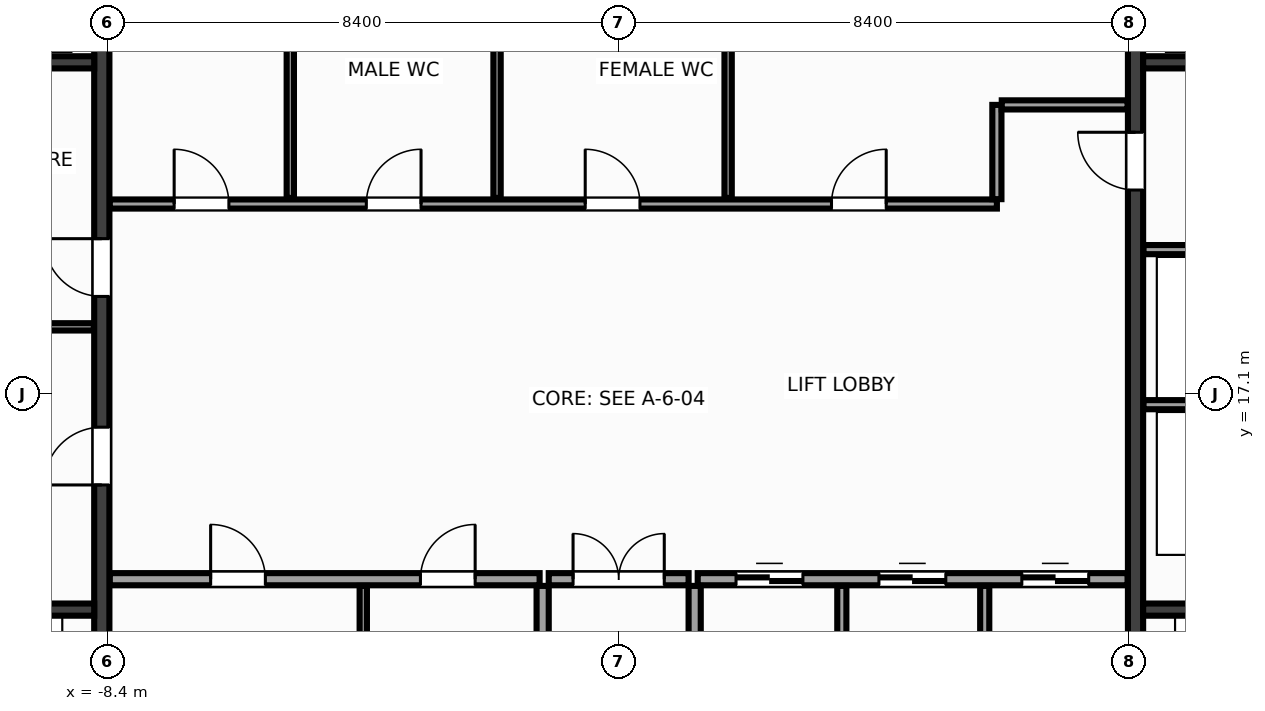
"""IFC4 building model, lengths in metres.
Left out: names, types, materials, properties, quantities, classifications, styles, units other than length and angle.
Written with IfcOpenShell. Run it as: python <this file> out.ifc"""

import sys

from ifc_helpers import new_model, si_unit, direction, frame, frame_2d, origin, place, context, subcontext, project, spatial, rectangle, extrude, source, transform, mapped, element, fill, save


model = new_model("IFC4")
c1 = context("Model", 3, precision=1e-05, world=origin(), true_north=direction((0.0, 1.0)))
c2 = subcontext(c1, "Body", "Model", "MODEL_VIEW")
j1 = project(units=[si_unit("LENGTHUNIT", "METRE"), si_unit("PLANEANGLEUNIT", "RADIAN")], contexts=[c1])
p1 = place(None, origin())
s1 = spatial("IfcSite", under=j1, at=p1, CompositionType="ELEMENT")
p2 = place(p1, origin())
s2 = spatial("IfcBuilding", under=s1, at=p2, CompositionType="ELEMENT")
p3 = place(p2, frame((0.0, 0.0, 117.2)))
s3 = spatial("IfcBuildingStorey", under=s2, at=p3, CompositionType="ELEMENT", Elevation=117.2)
m1 = source(origin(), c2, "Body", "SweptSolid", [
    extrude(rectangle(XDim=12.95, YDim=0.25, at=frame_2d((6.475, 0.0))), origin(), (0.0, 0.0, 1.0), 3.6),
])
p4 = place(p3, frame((-8.5, 10.525, 0.0), z_axis=(0.0, 0.0, 1.0), x_axis=(0.0, 1.0, 0.0)))
e1 = element("IfcWall", 1, at=p4, inside=s3, PredefinedType="SHEAR", context=c2, shape_type="MappedRepresentation", body=[
    mapped(m1, transform((0.0, 0.0, 0.0), x_axis=(1.0, 0.0, 0.0), y_axis=(0.0, 1.0, 0.0), z_axis=(0.0, 0.0, 1.0), scale=1.0)),
])
p5 = place(p4, frame((5.075, 0.0, 0.0)))
e2 = element("IfcOpeningElement", 2, at=p5, cuts=e1, PredefinedType="OPENING", context=c2, shape_type="SweptSolid", body=[
    extrude(rectangle(XDim=0.95, YDim=2.15, at=frame_2d((0.475, 1.075))), frame((0.0, 0.137, 0.0), z_axis=(0.0, -1.0, 0.0), x_axis=(1.0, 0.0, 0.0)), (0.0, 0.0, 1.0), 0.274),
])
p6 = place(p4, frame((8.175, 0.0, 0.0)))
e3 = element("IfcOpeningElement", 3, at=p6, cuts=e1, PredefinedType="OPENING", context=c2, shape_type="SweptSolid", body=[
    extrude(rectangle(XDim=0.95, YDim=2.15, at=frame_2d((0.475, 1.075))), frame((0.0, 0.137, 0.0), z_axis=(0.0, -1.0, 0.0), x_axis=(1.0, 0.0, 0.0)), (0.0, 0.0, 1.0), 0.274),
])
p7 = place(p3, frame((8.5, 10.525, 0.0), z_axis=(0.0, 0.0, 1.0), x_axis=(0.0, 1.0, 0.0)))
e4 = element("IfcWall", 4, at=p7, inside=s3, PredefinedType="SHEAR", context=c2, shape_type="MappedRepresentation", body=[
    mapped(m1, transform((0.0, 0.0, 0.0), x_axis=(1.0, 0.0, 0.0), y_axis=(0.0, 1.0, 0.0), z_axis=(0.0, 0.0, 1.0), scale=1.0)),
])
p8 = place(p7, frame((9.925, 0.0, 0.0)))
e5 = element("IfcOpeningElement", 5, at=p8, cuts=e4, PredefinedType="OPENING", context=c2, shape_type="SweptSolid", body=[
    extrude(rectangle(XDim=0.95, YDim=2.15, at=frame_2d((0.475, 1.075))), frame((0.0, 0.137, 0.0), z_axis=(0.0, -1.0, 0.0), x_axis=(1.0, 0.0, 0.0)), (0.0, 0.0, 1.0), 0.274),
])
m2 = source(origin(), c2, "Body", "SweptSolid", [
    extrude(rectangle(XDim=2.825, YDim=0.2, at=frame_2d((1.413, 0.0))), origin(), (0.0, 0.0, 1.0), 3.6),
])
for number, where, z_axis, x_axis in (
    (6, (-11.45, 13.55, 0.0), (0.0, 0.0, 1.0), (1.0, 0.0, 0.0)),
    (7, (8.625, 13.55, 0.0), (0.0, 0.0, 1.0), (1.0, 0.0, 0.0)),
):
    element("IfcWall", number, at=place(p3, frame(where, z_axis=z_axis, x_axis=x_axis)), inside=s3, PredefinedType="SHEAR", context=c2, shape_type="MappedRepresentation", body=[
        mapped(m2, transform((0.0, 0.0, 0.0), x_axis=(1.0, 0.0, 0.0), y_axis=(0.0, 1.0, 0.0), z_axis=(0.0, 0.0, 1.0), scale=1.0)),
    ])
m3 = source(origin(), c2, "Body", "SweptSolid", [
    extrude(rectangle(XDim=3.02, YDim=0.2, at=frame_2d((1.51, 0.0))), origin(), (0.0, 0.0, 1.0), 3.6),
])
for number, where, z_axis, x_axis in (
    (8, (-11.645, 22.55, 0.0), (0.0, 0.0, 1.0), (1.0, 0.0, 0.0)),
    (9, (8.625, 22.55, 0.0), (0.0, 0.0, 1.0), (1.0, 0.0, 0.0)),
):
    element("IfcWall", number, at=place(p3, frame(where, z_axis=z_axis, x_axis=x_axis)), inside=s3, PredefinedType="SHEAR", context=c2, shape_type="MappedRepresentation", body=[
        mapped(m3, transform((0.0, 0.0, 0.0), x_axis=(1.0, 0.0, 0.0), y_axis=(0.0, 1.0, 0.0), z_axis=(0.0, 0.0, 1.0), scale=1.0)),
    ])
m4 = source(origin(), c2, "Body", "SweptSolid", [
    extrude(rectangle(XDim=3.01, YDim=0.12, at=frame_2d((1.505, 0.0))), origin(), (0.0, 0.0, 1.0), 3.36),
])
p9 = place(p3, frame((-11.64, 18.2, 0.0), z_axis=(0.0, 0.0, 1.0), x_axis=(1.0, 0.0, 0.0)))
e10 = element("IfcWall", 10, at=p9, inside=s3, PredefinedType="PARTITIONING", context=c2, shape_type="MappedRepresentation", body=[
    mapped(m4, transform((0.0, 0.0, 0.0), x_axis=(1.0, 0.0, 0.0), y_axis=(0.0, 1.0, 0.0), z_axis=(0.0, 0.0, 1.0), scale=1.0)),
])
m5 = source(origin(), c2, "Body", "SweptSolid", [
    extrude(rectangle(XDim=3.01, YDim=0.15, at=frame_2d((1.505, 0.0))), origin(), (0.0, 0.0, 1.0), 3.36),
])
for number, where, z_axis, x_axis in (
    (11, (8.63, 16.92, 0.0), (0.0, 0.0, 1.0), (1.0, 0.0, 0.0)),
    (12, (8.63, 19.47, 0.0), (0.0, 0.0, 1.0), (1.0, 0.0, 0.0)),
):
    element("IfcWall", number, at=place(p3, frame(where, z_axis=z_axis, x_axis=x_axis)), inside=s3, PredefinedType="PARTITIONING", context=c2, shape_type="MappedRepresentation", body=[
        mapped(m5, transform((0.0, 0.0, 0.0), x_axis=(1.0, 0.0, 0.0), y_axis=(0.0, 1.0, 0.0), z_axis=(0.0, 0.0, 1.0), scale=1.0)),
    ])
m6 = source(origin(), c2, "Body", "SweptSolid", [
    extrude(rectangle(XDim=7.07, YDim=0.2, at=frame_2d((3.535, 0.0))), origin(), (0.0, 0.0, 1.0), 3.36),
])
p10 = place(p3, frame((-8.37, 14.05, 0.0), z_axis=(0.0, 0.0, 1.0), x_axis=(1.0, 0.0, 0.0)))
e13 = element("IfcWall", 13, at=p10, inside=s3, PredefinedType="PARTITIONING", context=c2, shape_type="MappedRepresentation", body=[
    mapped(m6, transform((0.0, 0.0, 0.0), x_axis=(1.0, 0.0, 0.0), y_axis=(0.0, 1.0, 0.0), z_axis=(0.0, 0.0, 1.0), scale=1.0)),
])
p11 = place(p10, frame((1.66, 0.0, 0.0)))
e14 = element("IfcOpeningElement", 14, at=p11, cuts=e13, PredefinedType="OPENING", context=c2, shape_type="SweptSolid", body=[
    extrude(rectangle(XDim=0.9, YDim=2.15, at=frame_2d((0.45, 1.075))), frame((0.0, 0.112, 0.0), z_axis=(0.0, -1.0, 0.0), x_axis=(1.0, 0.0, 0.0)), (0.0, 0.0, 1.0), 0.224),
])
p12 = place(p10, frame((5.11, 0.0, 0.0)))
e15 = element("IfcOpeningElement", 15, at=p12, cuts=e13, PredefinedType="OPENING", context=c2, shape_type="SweptSolid", body=[
    extrude(rectangle(XDim=0.9, YDim=2.15, at=frame_2d((0.45, 1.075))), frame((0.0, 0.112, 0.0), z_axis=(0.0, -1.0, 0.0), x_axis=(1.0, 0.0, 0.0)), (0.0, 0.0, 1.0), 0.224),
])
p13 = place(p3, frame((1.3, 14.05, 0.0), z_axis=(0.0, 0.0, 1.0), x_axis=(1.0, 0.0, 0.0)))
e16 = element("IfcWall", 16, at=p13, inside=s3, PredefinedType="PARTITIONING", context=c2, shape_type="MappedRepresentation", body=[
    mapped(m6, transform((0.0, 0.0, 0.0), x_axis=(1.0, 0.0, 0.0), y_axis=(0.0, 1.0, 0.0), z_axis=(0.0, 0.0, 1.0), scale=1.0)),
])
p14 = place(p13, frame((0.63, 0.0, 0.0)))
e17 = element("IfcOpeningElement", 17, at=p14, cuts=e16, PredefinedType="OPENING", context=c2, shape_type="SweptSolid", body=[
    extrude(rectangle(XDim=1.1, YDim=2.15, at=frame_2d((0.55, 1.075))), frame((0.0, 0.112, 0.0), z_axis=(0.0, -1.0, 0.0), x_axis=(1.0, 0.0, 0.0)), (0.0, 0.0, 1.0), 0.224),
])
p15 = place(p13, frame((2.98, 0.0, 0.0)))
e18 = element("IfcOpeningElement", 18, at=p15, cuts=e16, PredefinedType="OPENING", context=c2, shape_type="SweptSolid", body=[
    extrude(rectangle(XDim=1.1, YDim=2.15, at=frame_2d((0.55, 1.075))), frame((0.0, 0.112, 0.0), z_axis=(0.0, -1.0, 0.0), x_axis=(1.0, 0.0, 0.0)), (0.0, 0.0, 1.0), 0.224),
])
p16 = place(p13, frame((5.33, 0.0, 0.0)))
e19 = element("IfcOpeningElement", 19, at=p16, cuts=e16, PredefinedType="OPENING", context=c2, shape_type="SweptSolid", body=[
    extrude(rectangle(XDim=1.1, YDim=2.15, at=frame_2d((0.55, 1.075))), frame((0.0, 0.112, 0.0), z_axis=(0.0, -1.0, 0.0), x_axis=(1.0, 0.0, 0.0)), (0.0, 0.0, 1.0), 0.224),
])
m7 = source(origin(), c2, "Body", "SweptSolid", [
    extrude(rectangle(XDim=3.415, YDim=0.2, at=frame_2d((1.708, 0.0))), origin(), (0.0, 0.0, 1.0), 3.36),
])
for number, where, z_axis, x_axis in (
    (20, (-1.25, 10.525, 0.0), (0.0, 0.0, 1.0), (0.0, 1.0, 0.0)),
    (21, (1.25, 10.525, 0.0), (0.0, 0.0, 1.0), (0.0, 1.0, 0.0)),
):
    element("IfcWall", number, at=place(p3, frame(where, z_axis=z_axis, x_axis=x_axis)), inside=s3, PredefinedType="PARTITIONING", context=c2, shape_type="MappedRepresentation", body=[
        mapped(m7, transform((0.0, 0.0, 0.0), x_axis=(1.0, 0.0, 0.0), y_axis=(0.0, 1.0, 0.0), z_axis=(0.0, 0.0, 1.0), scale=1.0)),
    ])
m8 = source(origin(), c2, "Body", "SweptSolid", [
    extrude(rectangle(XDim=2.3, YDim=0.2, at=frame_2d((1.15, 0.0))), origin(), (0.0, 0.0, 1.0), 3.36),
])
p17 = place(p3, frame((-1.15, 14.05, 0.0), z_axis=(0.0, 0.0, 1.0), x_axis=(1.0, 0.0, 0.0)))
e22 = element("IfcWall", 22, at=p17, inside=s3, PredefinedType="PARTITIONING", context=c2, shape_type="MappedRepresentation", body=[
    mapped(m8, transform((0.0, 0.0, 0.0), x_axis=(1.0, 0.0, 0.0), y_axis=(0.0, 1.0, 0.0), z_axis=(0.0, 0.0, 1.0), scale=1.0)),
])
p18 = place(p17, frame((0.4, 0.0, 0.0)))
e23 = element("IfcOpeningElement", 23, at=p18, cuts=e22, PredefinedType="OPENING", context=c2, shape_type="SweptSolid", body=[
    extrude(rectangle(XDim=1.5, YDim=2.2, at=frame_2d((0.75, 1.1))), frame((0.0, 0.112, 0.0), z_axis=(0.0, -1.0, 0.0), x_axis=(1.0, 0.0, 0.0)), (0.0, 0.0, 1.0), 0.224),
])
m9 = source(origin(), c2, "Body", "SweptSolid", [
    extrude(rectangle(XDim=14.59, YDim=0.15, at=frame_2d((7.295, 0.0))), origin(), (0.0, 0.0, 1.0), 3.36),
])
p19 = place(p3, frame((-8.37, 20.22, 0.0), z_axis=(0.0, 0.0, 1.0), x_axis=(1.0, 0.0, 0.0)))
e24 = element("IfcWall", 24, at=p19, inside=s3, PredefinedType="PARTITIONING", context=c2, shape_type="MappedRepresentation", body=[
    mapped(m9, transform((0.0, 0.0, 0.0), x_axis=(1.0, 0.0, 0.0), y_axis=(0.0, 1.0, 0.0), z_axis=(0.0, 0.0, 1.0), scale=1.0)),
])
p20 = place(p19, frame((1.06, 0.0, 0.0)))
e25 = element("IfcOpeningElement", 25, at=p20, cuts=e24, PredefinedType="OPENING", context=c2, shape_type="SweptSolid", body=[
    extrude(rectangle(XDim=0.9, YDim=2.15, at=frame_2d((0.45, 1.075))), frame((0.0, 0.087, 0.0), z_axis=(0.0, -1.0, 0.0), x_axis=(1.0, 0.0, 0.0)), (0.0, 0.0, 1.0), 0.174),
])
p21 = place(p19, frame((4.22, 0.0, 0.0)))
e26 = element("IfcOpeningElement", 26, at=p21, cuts=e24, PredefinedType="OPENING", context=c2, shape_type="SweptSolid", body=[
    extrude(rectangle(XDim=0.9, YDim=2.15, at=frame_2d((0.45, 1.075))), frame((0.0, 0.087, 0.0), z_axis=(0.0, -1.0, 0.0), x_axis=(1.0, 0.0, 0.0)), (0.0, 0.0, 1.0), 0.174),
])
p22 = place(p19, frame((7.82, 0.0, 0.0)))
e27 = element("IfcOpeningElement", 27, at=p22, cuts=e24, PredefinedType="OPENING", context=c2, shape_type="SweptSolid", body=[
    extrude(rectangle(XDim=0.9, YDim=2.15, at=frame_2d((0.45, 1.075))), frame((0.0, 0.087, 0.0), z_axis=(0.0, -1.0, 0.0), x_axis=(1.0, 0.0, 0.0)), (0.0, 0.0, 1.0), 0.174),
])
p23 = place(p19, frame((11.87, 0.0, 0.0)))
e28 = element("IfcOpeningElement", 28, at=p23, cuts=e24, PredefinedType="OPENING", context=c2, shape_type="SweptSolid", body=[
    extrude(rectangle(XDim=0.9, YDim=2.15, at=frame_2d((0.45, 1.075))), frame((0.0, 0.087, 0.0), z_axis=(0.0, -1.0, 0.0), x_axis=(1.0, 0.0, 0.0)), (0.0, 0.0, 1.0), 0.174),
])
m10 = source(origin(), c2, "Body", "SweptSolid", [
    extrude(rectangle(XDim=1.55, YDim=0.15, at=frame_2d((0.775, 0.0))), origin(), (0.0, 0.0, 1.0), 3.36),
])
p24 = place(p3, frame((6.22, 20.3, 0.0), z_axis=(0.0, 0.0, 1.0), x_axis=(0.0, 1.0, 0.0)))
e29 = element("IfcWall", 29, at=p24, inside=s3, PredefinedType="PARTITIONING", context=c2, shape_type="MappedRepresentation", body=[
    mapped(m10, transform((0.0, 0.0, 0.0), x_axis=(1.0, 0.0, 0.0), y_axis=(0.0, 1.0, 0.0), z_axis=(0.0, 0.0, 1.0), scale=1.0)),
])
m11 = source(origin(), c2, "Body", "SweptSolid", [
    extrude(rectangle(XDim=2.07, YDim=0.15, at=frame_2d((1.035, 0.0))), origin(), (0.0, 0.0, 1.0), 3.36),
])
p25 = place(p3, frame((6.3, 21.85, 0.0), z_axis=(0.0, 0.0, 1.0), x_axis=(1.0, 0.0, 0.0)))
e30 = element("IfcWall", 30, at=p25, inside=s3, PredefinedType="PARTITIONING", context=c2, shape_type="MappedRepresentation", body=[
    mapped(m11, transform((0.0, 0.0, 0.0), x_axis=(1.0, 0.0, 0.0), y_axis=(0.0, 1.0, 0.0), z_axis=(0.0, 0.0, 1.0), scale=1.0)),
])
m12 = source(origin(), c2, "Body", "SweptSolid", [
    extrude(rectangle(XDim=3.415, YDim=0.12, at=frame_2d((1.708, 0.0))), origin(), (0.0, 0.0, 1.0), 3.36),
])
p26 = place(p3, frame((-4.2, 10.525, 0.0), z_axis=(0.0, 0.0, 1.0), x_axis=(0.0, 1.0, 0.0)))
e31 = element("IfcWall", 31, at=p26, inside=s3, PredefinedType="PARTITIONING", context=c2, shape_type="MappedRepresentation", body=[
    mapped(m12, transform((0.0, 0.0, 0.0), x_axis=(1.0, 0.0, 0.0), y_axis=(0.0, 1.0, 0.0), z_axis=(0.0, 0.0, 1.0), scale=1.0)),
])
m13 = source(origin(), c2, "Body", "SweptSolid", [
    extrude(rectangle(XDim=3.415, YDim=0.15, at=frame_2d((1.708, 0.0))), origin(), (0.0, 0.0, 1.0), 3.36),
])
for number, where, z_axis, x_axis in (
    (32, (3.67, 10.525, 0.0), (0.0, 0.0, 1.0), (0.0, 1.0, 0.0)),
    (33, (6.02, 10.525, 0.0), (0.0, 0.0, 1.0), (0.0, 1.0, 0.0)),
):
    element("IfcWall", number, at=place(p3, frame(where, z_axis=z_axis, x_axis=x_axis)), inside=s3, PredefinedType="PARTITIONING", context=c2, shape_type="MappedRepresentation", body=[
        mapped(m13, transform((0.0, 0.0, 0.0), x_axis=(1.0, 0.0, 0.0), y_axis=(0.0, 1.0, 0.0), z_axis=(0.0, 0.0, 1.0), scale=1.0)),
    ])
m14 = source(origin(), c2, "Body", "SweptSolid", [
    extrude(rectangle(XDim=3.115, YDim=0.12, at=frame_2d((1.558, 0.0))), origin(), (0.0, 0.0, 1.0), 3.36),
])
for number, where, z_axis, x_axis in (
    (34, (-5.4, 20.32, 0.0), (0.0, 0.0, 1.0), (0.0, 1.0, 0.0)),
    (35, (-2.0, 20.32, 0.0), (0.0, 0.0, 1.0), (0.0, 1.0, 0.0)),
    (36, (1.8, 20.32, 0.0), (0.0, 0.0, 1.0), (0.0, 1.0, 0.0)),
):
    element("IfcWall", number, at=place(p3, frame(where, z_axis=z_axis, x_axis=x_axis)), inside=s3, PredefinedType="PARTITIONING", context=c2, shape_type="MappedRepresentation", body=[
        mapped(m14, transform((0.0, 0.0, 0.0), x_axis=(1.0, 0.0, 0.0), y_axis=(0.0, 1.0, 0.0), z_axis=(0.0, 0.0, 1.0), scale=1.0)),
    ])
m15 = source(origin(), c2, "Body", "SweptSolid", [
    extrude(rectangle(XDim=0.95, YDim=2.15, at=frame_2d((0.475, 1.075))), frame((0.0, 0.025, 0.0), z_axis=(0.0, -1.0, 0.0), x_axis=(1.0, 0.0, 0.0)), (0.0, 0.0, 1.0), 0.05),
])
p27 = place(p5, origin())
e37 = element("IfcDoor", 37, at=p27, inside=s3, OperationType="SINGLE_SWING_LEFT", PredefinedType="DOOR", context=c2, shape_type="MappedRepresentation", body=[
    mapped(m15, transform((0.0, 0.0, 0.0), x_axis=(1.0, 0.0, 0.0), y_axis=(0.0, 1.0, 0.0), z_axis=(0.0, 0.0, 1.0), scale=1.0)),
])
fill(e2, e37)
p28 = place(p6, origin())
e38 = element("IfcDoor", 38, at=p28, inside=s3, OperationType="SINGLE_SWING_RIGHT", PredefinedType="DOOR", context=c2, shape_type="MappedRepresentation", body=[
    mapped(m15, transform((0.0, 0.0, 0.0), x_axis=(1.0, 0.0, 0.0), y_axis=(0.0, 1.0, 0.0), z_axis=(0.0, 0.0, 1.0), scale=1.0)),
])
fill(e3, e38)
m16 = source(origin(), c2, "Body", "SweptSolid", [
    extrude(rectangle(XDim=0.95, YDim=2.15, at=frame_2d((0.475, 1.075))), frame((0.0, 0.025, 0.0), z_axis=(0.0, -1.0, 0.0), x_axis=(1.0, 0.0, 0.0)), (0.0, 0.0, 1.0), 0.05),
])
p29 = place(p8, origin())
e39 = element("IfcDoor", 39, at=p29, inside=s3, OperationType="SINGLE_SWING_RIGHT", PredefinedType="DOOR", context=c2, shape_type="MappedRepresentation", body=[
    mapped(m16, transform((0.0, 0.0, 0.0), x_axis=(1.0, 0.0, 0.0), y_axis=(0.0, 1.0, 0.0), z_axis=(0.0, 0.0, 1.0), scale=1.0)),
])
fill(e5, e39)
m17 = source(origin(), c2, "Body", "SweptSolid", [
    extrude(rectangle(XDim=0.9, YDim=2.15, at=frame_2d((0.45, 1.075))), frame((0.0, 0.025, 0.0), z_axis=(0.0, -1.0, 0.0), x_axis=(1.0, 0.0, 0.0)), (0.0, 0.0, 1.0), 0.05),
])
p30 = place(p11, origin())
e40 = element("IfcDoor", 40, at=p30, inside=s3, OperationType="SINGLE_SWING_LEFT", PredefinedType="DOOR", context=c2, shape_type="MappedRepresentation", body=[
    mapped(m17, transform((0.0, 0.0, 0.0), x_axis=(1.0, 0.0, 0.0), y_axis=(0.0, 1.0, 0.0), z_axis=(0.0, 0.0, 1.0), scale=1.0)),
])
fill(e14, e40)
p31 = place(p12, origin())
e41 = element("IfcDoor", 41, at=p31, inside=s3, OperationType="SINGLE_SWING_RIGHT", PredefinedType="DOOR", context=c2, shape_type="MappedRepresentation", body=[
    mapped(m17, transform((0.0, 0.0, 0.0), x_axis=(1.0, 0.0, 0.0), y_axis=(0.0, 1.0, 0.0), z_axis=(0.0, 0.0, 1.0), scale=1.0)),
])
fill(e15, e41)
m18 = source(origin(), c2, "Body", "SweptSolid", [
    extrude(rectangle(XDim=1.1, YDim=2.15, at=frame_2d((0.55, 1.075))), frame((0.0, 0.025, 0.0), z_axis=(0.0, -1.0, 0.0), x_axis=(1.0, 0.0, 0.0)), (0.0, 0.0, 1.0), 0.05),
])
p32 = place(p14, origin())
e42 = element("IfcDoor", 42, at=p32, inside=s3, OperationType="DOUBLE_DOOR_SLIDING", PredefinedType="DOOR", context=c2, shape_type="MappedRepresentation", body=[
    mapped(m18, transform((0.0, 0.0, 0.0), x_axis=(1.0, 0.0, 0.0), y_axis=(0.0, 1.0, 0.0), z_axis=(0.0, 0.0, 1.0), scale=1.0)),
])
fill(e17, e42)
p33 = place(p15, origin())
e43 = element("IfcDoor", 43, at=p33, inside=s3, OperationType="DOUBLE_DOOR_SLIDING", PredefinedType="DOOR", context=c2, shape_type="MappedRepresentation", body=[
    mapped(m18, transform((0.0, 0.0, 0.0), x_axis=(1.0, 0.0, 0.0), y_axis=(0.0, 1.0, 0.0), z_axis=(0.0, 0.0, 1.0), scale=1.0)),
])
fill(e18, e43)
p34 = place(p16, origin())
e44 = element("IfcDoor", 44, at=p34, inside=s3, OperationType="DOUBLE_DOOR_SLIDING", PredefinedType="DOOR", context=c2, shape_type="MappedRepresentation", body=[
    mapped(m18, transform((0.0, 0.0, 0.0), x_axis=(1.0, 0.0, 0.0), y_axis=(0.0, 1.0, 0.0), z_axis=(0.0, 0.0, 1.0), scale=1.0)),
])
fill(e19, e44)
m19 = source(origin(), c2, "Body", "SweptSolid", [
    extrude(rectangle(XDim=1.5, YDim=2.2, at=frame_2d((0.75, 1.1))), frame((0.0, 0.025, 0.0), z_axis=(0.0, -1.0, 0.0), x_axis=(1.0, 0.0, 0.0)), (0.0, 0.0, 1.0), 0.05),
])
p35 = place(p18, origin())
e45 = element("IfcDoor", 45, at=p35, inside=s3, OperationType="DOUBLE_DOOR_SINGLE_SWING", PredefinedType="DOOR", context=c2, shape_type="MappedRepresentation", body=[
    mapped(m19, transform((0.0, 0.0, 0.0), x_axis=(1.0, 0.0, 0.0), y_axis=(0.0, 1.0, 0.0), z_axis=(0.0, 0.0, 1.0), scale=1.0)),
])
fill(e23, e45)
p36 = place(p20, origin())
e46 = element("IfcDoor", 46, at=p36, inside=s3, OperationType="SINGLE_SWING_LEFT", PredefinedType="DOOR", context=c2, shape_type="MappedRepresentation", body=[
    mapped(m17, transform((0.0, 0.0, 0.0), x_axis=(1.0, 0.0, 0.0), y_axis=(0.0, 1.0, 0.0), z_axis=(0.0, 0.0, 1.0), scale=1.0)),
])
fill(e25, e46)
p37 = place(p21, origin())
e47 = element("IfcDoor", 47, at=p37, inside=s3, OperationType="SINGLE_SWING_RIGHT", PredefinedType="DOOR", context=c2, shape_type="MappedRepresentation", body=[
    mapped(m17, transform((0.0, 0.0, 0.0), x_axis=(1.0, 0.0, 0.0), y_axis=(0.0, 1.0, 0.0), z_axis=(0.0, 0.0, 1.0), scale=1.0)),
])
fill(e26, e47)
p38 = place(p22, origin())
e48 = element("IfcDoor", 48, at=p38, inside=s3, OperationType="SINGLE_SWING_LEFT", PredefinedType="DOOR", context=c2, shape_type="MappedRepresentation", body=[
    mapped(m17, transform((0.0, 0.0, 0.0), x_axis=(1.0, 0.0, 0.0), y_axis=(0.0, 1.0, 0.0), z_axis=(0.0, 0.0, 1.0), scale=1.0)),
])
fill(e27, e48)
p39 = place(p23, origin())
e49 = element("IfcDoor", 49, at=p39, inside=s3, OperationType="SINGLE_SWING_RIGHT", PredefinedType="DOOR", context=c2, shape_type="MappedRepresentation", body=[
    mapped(m17, transform((0.0, 0.0, 0.0), x_axis=(1.0, 0.0, 0.0), y_axis=(0.0, 1.0, 0.0), z_axis=(0.0, 0.0, 1.0), scale=1.0)),
])
fill(e28, e49)
save(model, sys.argv[1])
